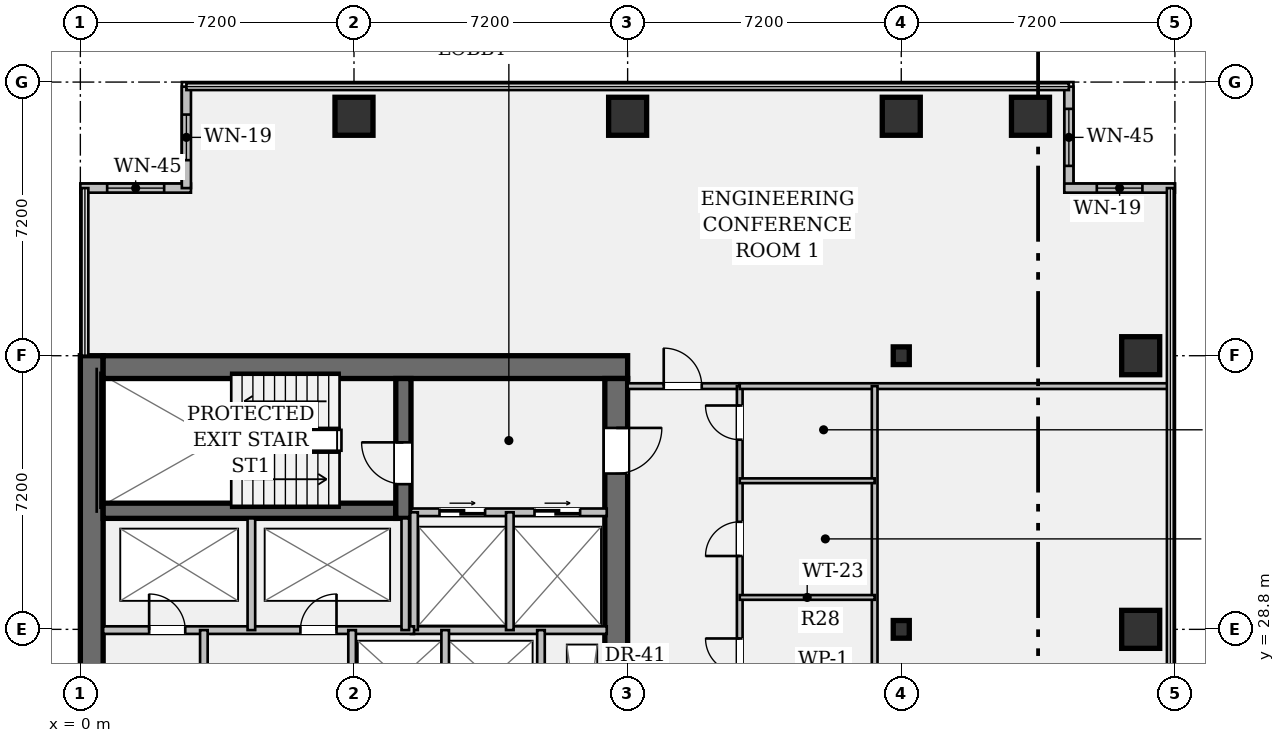
"""IFC4 building model, lengths in metres.
Left out: names, types, materials, properties, quantities, classifications, styles, units other than length and angle.
Written with IfcOpenShell. Run it as: python <this file> out.ifc"""

import sys

from ifc_helpers import new_model, si_unit, direction, frame, frame_2d, origin, origin_2d, place, context, subcontext, project, spatial, rectangle, hollow_rectangle, i_section, extrude, element, fill, save


model = new_model("IFC4")
c1 = context("Model", 3, precision=1e-05, world=origin(), true_north=direction((0.0, 1.0)))
c2 = subcontext(c1, "Body", "Model", "MODEL_VIEW")
j1 = project(units=[si_unit("LENGTHUNIT", "METRE"), si_unit("PLANEANGLEUNIT", "RADIAN")], contexts=[c1])
p1 = place(None, origin())
s1 = spatial("IfcSite", under=j1, at=p1, CompositionType="ELEMENT")
p2 = place(p1, origin())
s2 = spatial("IfcBuilding", under=s1, at=p2, CompositionType="ELEMENT")
p3 = place(p2, frame((0.0, 0.0, 58.1)))
s3 = spatial("IfcBuildingStorey", under=s2, at=p3, CompositionType="ELEMENT", Elevation=58.1)
p4 = place(p3, frame((0.3, 7.2, 0.0), z_axis=(0.0, 0.0, 1.0), x_axis=(0.0, 1.0, 0.0)))
e1 = element("IfcWall", 1, at=p4, inside=s3, PredefinedType="SHEAR", context=c2, shape_type="SweptSolid", body=[
    extrude(rectangle(XDim=28.8, YDim=0.6, at=frame_2d((14.4, 0.0))), origin(), (0.0, 0.0, 1.0), 3.57),
])
p5 = place(p3, frame((0.6, 35.7, 0.0), z_axis=(0.0, 0.0, 1.0), x_axis=(1.0, 0.0, 0.0)))
e2 = element("IfcWall", 2, at=p5, inside=s3, PredefinedType="SHEAR", context=c2, shape_type="SweptSolid", body=[
    extrude(rectangle(XDim=13.8, YDim=0.6, at=frame_2d((6.9, 0.0))), origin(), (0.0, 0.0, 1.0), 3.57),
])
p6 = place(p3, frame((14.1, 35.4, 0.0), z_axis=(0.0, 0.0, 1.0), x_axis=(0.0, -1.0, 0.0)))
e3 = element("IfcWall", 3, at=p6, inside=s3, PredefinedType="SHEAR", context=c2, shape_type="SweptSolid", body=[
    extrude(rectangle(XDim=27.6, YDim=0.6, at=frame_2d((13.8, 0.0))), origin(), (0.0, 0.0, 1.0), 3.57),
])
p7 = place(p6, frame((1.3, 0.0, 0.0)))
e4 = element("IfcOpeningElement", 4, at=p7, cuts=e3, PredefinedType="OPENING", context=c2, shape_type="SweptSolid", body=[
    extrude(rectangle(XDim=1.2, YDim=2.15, at=frame_2d((0.6, 1.075))), frame((0.0, 0.312, 0.0), z_axis=(0.0, -1.0, 0.0), x_axis=(1.0, 0.0, 0.0)), (0.0, 0.0, 1.0), 0.624),
])
p8 = place(p6, frame((25.25, 0.0, 0.0)))
e5 = element("IfcOpeningElement", 5, at=p8, cuts=e3, PredefinedType="OPENING", context=c2, shape_type="SweptSolid", body=[
    extrude(rectangle(XDim=1.2, YDim=2.15, at=frame_2d((0.6, 1.075))), frame((0.0, 0.312, 0.0), z_axis=(0.0, -1.0, 0.0), x_axis=(1.0, 0.0, 0.0)), (0.0, 0.0, 1.0), 0.624),
])
p9 = place(p6, frame((14.6, 0.0, 0.0)))
e6 = element("IfcOpeningElement", 6, at=p9, cuts=e3, PredefinedType="OPENING", context=c2, shape_type="SweptSolid", body=[
    extrude(rectangle(XDim=1.6, YDim=2.2, at=frame_2d((0.8, 1.1))), frame((0.0, 0.312, 0.0), z_axis=(0.0, -1.0, 0.0), x_axis=(1.0, 0.0, 0.0)), (0.0, 0.0, 1.0), 0.624),
])
p10 = place(p3, frame((0.6, 31.92, 0.0), z_axis=(0.0, 0.0, 1.0), x_axis=(1.0, 0.0, 0.0)))
e7 = element("IfcWall", 7, at=p10, inside=s3, PredefinedType="SHEAR", context=c2, shape_type="SweptSolid", body=[
    extrude(rectangle(XDim=7.7, YDim=0.4, at=frame_2d((3.85, 0.0))), origin(), (0.0, 0.0, 1.0), 3.57),
])
p11 = place(p3, frame((8.5, 31.72, 0.0), z_axis=(0.0, 0.0, 1.0), x_axis=(0.0, 1.0, 0.0)))
e8 = element("IfcWall", 8, at=p11, inside=s3, PredefinedType="SHEAR", context=c2, shape_type="SweptSolid", body=[
    extrude(rectangle(XDim=3.68, YDim=0.4, at=frame_2d((1.84, 0.0))), origin(), (0.0, 0.0, 1.0), 3.57),
])
p12 = place(p11, frame((0.9, 0.0, 0.0)))
e9 = element("IfcOpeningElement", 9, at=p12, cuts=e8, PredefinedType="OPENING", context=c2, shape_type="SweptSolid", body=[
    extrude(rectangle(XDim=1.1, YDim=2.15, at=frame_2d((0.55, 1.075))), frame((0.0, 0.212, 0.0), z_axis=(0.0, -1.0, 0.0), x_axis=(1.0, 0.0, 0.0)), (0.0, 0.0, 1.0), 0.424),
])
for number, where, z_axis, x_axis in (
    (10, (7.2, 42.3, 0.0), (0.0, 0.0, 1.0), (1.0, 0.0, 0.0)),
    (11, (14.4, 42.3, 0.0), (0.0, 0.0, 1.0), (1.0, 0.0, 0.0)),
):
    element("IfcColumn", number, at=place(p3, frame(where, z_axis=z_axis, x_axis=x_axis)), inside=s3, PredefinedType="COLUMN", context=c2, shape_type="SweptSolid", body=[
        extrude(hollow_rectangle(XDim=1.0, YDim=1.0, WallThickness=0.065, at=origin_2d()), origin(), (0.0, 0.0, 1.0), 3.57),
    ])
for number, where, z_axis, x_axis in (
    (12, (21.6, 28.8, 0.0), (0.0, 0.0, 1.0), (1.0, 0.0, 0.0)),
    (13, (21.6, 36.0, 0.0), (0.0, 0.0, 1.0), (1.0, 0.0, 0.0)),
):
    element("IfcColumn", number, at=place(p3, frame(where, z_axis=z_axis, x_axis=x_axis)), inside=s3, PredefinedType="COLUMN", context=c2, shape_type="SweptSolid", body=[
        extrude(i_section(OverallWidth=0.422, OverallDepth=0.465, WebThickness=0.045, FlangeThickness=0.073, FilletRadius=0.018, at=origin_2d()), origin(), (0.0, 0.0, 1.0), 3.57),
    ])
for number, where, z_axis, x_axis in (
    (14, (21.6, 42.3, 0.0), (0.0, 0.0, 1.0), (1.0, 0.0, 0.0)),
    (15, (25.0, 42.3, 0.0), (0.0, 0.0, 1.0), (1.0, 0.0, 0.0)),
    (16, (27.9, 28.8, 0.0), (0.0, 0.0, 1.0), (1.0, 0.0, 0.0)),
    (17, (27.9, 36.0, 0.0), (0.0, 0.0, 1.0), (1.0, 0.0, 0.0)),
):
    element("IfcColumn", number, at=place(p3, frame(where, z_axis=z_axis, x_axis=x_axis)), inside=s3, PredefinedType="COLUMN", context=c2, shape_type="SweptSolid", body=[
        extrude(hollow_rectangle(XDim=1.0, YDim=1.0, WallThickness=0.065, at=origin_2d()), origin(), (0.0, 0.0, 1.0), 3.57),
    ])
p13 = place(p3, frame((0.0, 40.41, 0.0), z_axis=(0.0, 0.0, 1.0), x_axis=(1.0, 0.0, 0.0)))
e18 = element("IfcWall", 18, at=p13, inside=s3, PredefinedType="STANDARD", context=c2, shape_type="SweptSolid", body=[
    extrude(rectangle(XDim=2.91, YDim=0.24, at=frame_2d((1.455, 0.0))), origin(), (0.0, 0.0, 1.0), 3.57),
])
p14 = place(p13, frame((0.705, 0.0, 0.95)))
e19 = element("IfcOpeningElement", 19, at=p14, cuts=e18, PredefinedType="OPENING", context=c2, shape_type="SweptSolid", body=[
    extrude(rectangle(XDim=1.5, YDim=1.8, at=frame_2d((0.75, 0.9))), frame((0.0, 0.132, 0.0), z_axis=(0.0, -1.0, 0.0), x_axis=(1.0, 0.0, 0.0)), (0.0, 0.0, 1.0), 0.264),
])
p15 = place(p3, frame((2.79, 40.41, 0.0), z_axis=(0.0, 0.0, 1.0), x_axis=(0.0, 1.0, 0.0)))
e20 = element("IfcWall", 20, at=p15, inside=s3, PredefinedType="STANDARD", context=c2, shape_type="SweptSolid", body=[
    extrude(rectangle(XDim=2.67, YDim=0.24, at=frame_2d((1.335, 0.0))), origin(), (0.0, 0.0, 1.0), 3.57),
])
p16 = place(p15, frame((0.735, 0.0, 0.95)))
e21 = element("IfcOpeningElement", 21, at=p16, cuts=e20, PredefinedType="OPENING", context=c2, shape_type="SweptSolid", body=[
    extrude(rectangle(XDim=1.2, YDim=1.8, at=frame_2d((0.6, 0.9))), frame((0.0, 0.132, 0.0), z_axis=(0.0, -1.0, 0.0), x_axis=(1.0, 0.0, 0.0)), (0.0, 0.0, 1.0), 0.264),
])
p17 = place(p3, frame((26.01, 43.08, 0.0), z_axis=(0.0, 0.0, 1.0), x_axis=(0.0, -1.0, 0.0)))
e22 = element("IfcWall", 22, at=p17, inside=s3, PredefinedType="STANDARD", context=c2, shape_type="SweptSolid", body=[
    extrude(rectangle(XDim=2.67, YDim=0.24, at=frame_2d((1.335, 0.0))), origin(), (0.0, 0.0, 1.0), 3.57),
])
p18 = place(p17, frame((0.585, 0.0, 0.95)))
e23 = element("IfcOpeningElement", 23, at=p18, cuts=e22, PredefinedType="OPENING", context=c2, shape_type="SweptSolid", body=[
    extrude(rectangle(XDim=1.5, YDim=1.8, at=frame_2d((0.75, 0.9))), frame((0.0, 0.132, 0.0), z_axis=(0.0, -1.0, 0.0), x_axis=(1.0, 0.0, 0.0)), (0.0, 0.0, 1.0), 0.264),
])
p19 = place(p3, frame((25.89, 40.41, 0.0), z_axis=(0.0, 0.0, 1.0), x_axis=(1.0, 0.0, 0.0)))
e24 = element("IfcWall", 24, at=p19, inside=s3, PredefinedType="STANDARD", context=c2, shape_type="SweptSolid", body=[
    extrude(rectangle(XDim=2.91, YDim=0.24, at=frame_2d((1.455, 0.0))), origin(), (0.0, 0.0, 1.0), 3.57),
])
p20 = place(p19, frame((0.855, 0.0, 0.95)))
e25 = element("IfcOpeningElement", 25, at=p20, cuts=e24, PredefinedType="OPENING", context=c2, shape_type="SweptSolid", body=[
    extrude(rectangle(XDim=1.2, YDim=1.8, at=frame_2d((0.6, 0.9))), frame((0.0, 0.132, 0.0), z_axis=(0.0, -1.0, 0.0), x_axis=(1.0, 0.0, 0.0)), (0.0, 0.0, 1.0), 0.264),
])
p21 = place(p3, frame((8.7, 31.88, 0.0), z_axis=(0.0, 0.0, 1.0), x_axis=(1.0, 0.0, 0.0)))
e26 = element("IfcWall", 26, at=p21, inside=s3, PredefinedType="PARTITIONING", context=c2, shape_type="SweptSolid", body=[
    extrude(rectangle(XDim=5.15, YDim=0.2, at=frame_2d((2.575, 0.0))), origin(), (0.0, 0.0, 1.0), 3.57),
])
p22 = place(p21, frame((0.75, 0.0, 0.0)))
e27 = element("IfcOpeningElement", 27, at=p22, cuts=e26, PredefinedType="OPENING", context=c2, shape_type="SweptSolid", body=[
    extrude(rectangle(XDim=1.2, YDim=2.2, at=frame_2d((0.6, 1.1))), frame((0.0, 0.112, 0.0), z_axis=(0.0, -1.0, 0.0), x_axis=(1.0, 0.0, 0.0)), (0.0, 0.0, 1.0), 0.224),
])
p23 = place(p21, frame((3.25, 0.0, 0.0)))
e28 = element("IfcOpeningElement", 28, at=p23, cuts=e26, PredefinedType="OPENING", context=c2, shape_type="SweptSolid", body=[
    extrude(rectangle(XDim=1.2, YDim=2.2, at=frame_2d((0.6, 1.1))), frame((0.0, 0.112, 0.0), z_axis=(0.0, -1.0, 0.0), x_axis=(1.0, 0.0, 0.0)), (0.0, 0.0, 1.0), 0.224),
])
p24 = place(p3, frame((8.7, 28.78, 0.0), z_axis=(0.0, 0.0, 1.0), x_axis=(1.0, 0.0, 0.0)))
e29 = element("IfcWall", 29, at=p24, inside=s3, PredefinedType="PARTITIONING", context=c2, shape_type="SweptSolid", body=[
    extrude(rectangle(XDim=5.15, YDim=0.2, at=frame_2d((2.575, 0.0))), origin(), (0.0, 0.0, 1.0), 3.57),
])
for number, where, z_axis, x_axis in (
    (30, (8.78, 28.78, 0.0), (0.0, 0.0, 1.0), (0.0, 1.0, 0.0)),
    (31, (11.3, 28.78, 0.0), (0.0, 0.0, 1.0), (0.0, 1.0, 0.0)),
):
    element("IfcWall", number, at=place(p3, frame(where, z_axis=z_axis, x_axis=x_axis)), inside=s3, PredefinedType="PARTITIONING", context=c2, shape_type="SweptSolid", body=[
        extrude(rectangle(XDim=3.1, YDim=0.2, at=frame_2d((1.55, 0.0))), origin(), (0.0, 0.0, 1.0), 3.57),
    ])
p25 = place(p3, frame((0.6, 28.78, 0.0), z_axis=(0.0, 0.0, 1.0), x_axis=(1.0, 0.0, 0.0)))
e32 = element("IfcWall", 32, at=p25, inside=s3, PredefinedType="PARTITIONING", context=c2, shape_type="SweptSolid", body=[
    extrude(rectangle(XDim=8.18, YDim=0.2, at=frame_2d((4.09, 0.0))), origin(), (0.0, 0.0, 1.0), 3.57),
])
p26 = place(p25, frame((1.21, 0.0, 0.0)))
e33 = element("IfcOpeningElement", 33, at=p26, cuts=e32, PredefinedType="OPENING", context=c2, shape_type="SweptSolid", body=[
    extrude(rectangle(XDim=0.95, YDim=2.15, at=frame_2d((0.475, 1.075))), frame((0.0, 0.112, 0.0), z_axis=(0.0, -1.0, 0.0), x_axis=(1.0, 0.0, 0.0)), (0.0, 0.0, 1.0), 0.224),
])
p27 = place(p25, frame((5.19, 0.0, 0.0)))
e34 = element("IfcOpeningElement", 34, at=p27, cuts=e32, PredefinedType="OPENING", context=c2, shape_type="SweptSolid", body=[
    extrude(rectangle(XDim=0.95, YDim=2.15, at=frame_2d((0.475, 1.075))), frame((0.0, 0.112, 0.0), z_axis=(0.0, -1.0, 0.0), x_axis=(1.0, 0.0, 0.0)), (0.0, 0.0, 1.0), 0.224),
])
for number, where, z_axis, x_axis in (
    (35, (4.5, 28.78, 0.0), (0.0, 0.0, 1.0), (0.0, 1.0, 0.0)),
    (36, (8.55, 28.78, 0.0), (0.0, 0.0, 1.0), (0.0, 1.0, 0.0)),
):
    element("IfcWall", number, at=place(p3, frame(where, z_axis=z_axis, x_axis=x_axis)), inside=s3, PredefinedType="PARTITIONING", context=c2, shape_type="SweptSolid", body=[
        extrude(rectangle(XDim=2.94, YDim=0.2, at=frame_2d((1.47, 0.0))), origin(), (0.0, 0.0, 1.0), 3.57),
    ])
p28 = place(p3, frame((3.25, 15.7, 0.0), z_axis=(0.0, 0.0, 1.0), x_axis=(0.0, 1.0, 0.0)))
e37 = element("IfcWall", 37, at=p28, inside=s3, PredefinedType="PARTITIONING", context=c2, shape_type="SweptSolid", body=[
    extrude(rectangle(XDim=13.08, YDim=0.2, at=frame_2d((6.54, 0.0))), origin(), (0.0, 0.0, 1.0), 3.57),
])
for number, where, z_axis, x_axis in (
    (38, (7.15, 26.4, 0.0), (0.0, 0.0, 1.0), (0.0, 1.0, 0.0)),
    (39, (9.6, 26.4, 0.0), (0.0, 0.0, 1.0), (0.0, 1.0, 0.0)),
):
    element("IfcWall", number, at=place(p3, frame(where, z_axis=z_axis, x_axis=x_axis)), inside=s3, PredefinedType="PARTITIONING", context=c2, shape_type="SweptSolid", body=[
        extrude(rectangle(XDim=2.38, YDim=0.2, at=frame_2d((1.19, 0.0))), origin(), (0.0, 0.0, 1.0), 3.57),
    ])
p29 = place(p3, frame((12.12, 22.2, 0.0), z_axis=(0.0, 0.0, 1.0), x_axis=(0.0, 1.0, 0.0)))
e40 = element("IfcWall", 40, at=p29, inside=s3, PredefinedType="PARTITIONING", context=c2, shape_type="SweptSolid", body=[
    extrude(rectangle(XDim=6.58, YDim=0.2, at=frame_2d((3.29, 0.0))), origin(), (0.0, 0.0, 1.0), 3.57),
])
p30 = place(p29, frame((2.75, 0.0, 0.0)))
e41 = element("IfcOpeningElement", 41, at=p30, cuts=e40, PredefinedType="OPENING", context=c2, shape_type="SweptSolid", body=[
    extrude(rectangle(XDim=0.85, YDim=2.15, at=frame_2d((0.425, 1.075))), frame((0.0, 0.112, 0.0), z_axis=(0.0, -1.0, 0.0), x_axis=(1.0, 0.0, 0.0)), (0.0, 0.0, 1.0), 0.224),
])
p31 = place(p3, frame((14.4, 35.2, 0.0), z_axis=(0.0, 0.0, 1.0), x_axis=(1.0, 0.0, 0.0)))
e42 = element("IfcWall", 42, at=p31, inside=s3, PredefinedType="PARTITIONING", context=c2, shape_type="SweptSolid", body=[
    extrude(rectangle(XDim=2.95, YDim=0.15, at=frame_2d((1.475, 0.0))), origin(), (0.0, 0.0, 1.0), 3.088),
])
p32 = place(p31, frame((0.95, 0.0, 0.0)))
e43 = element("IfcOpeningElement", 43, at=p32, cuts=e42, PredefinedType="OPENING", context=c2, shape_type="SweptSolid", body=[
    extrude(rectangle(XDim=1.0, YDim=2.15, at=frame_2d((0.5, 1.075))), frame((0.0, 0.087, 0.0), z_axis=(0.0, -1.0, 0.0), x_axis=(1.0, 0.0, 0.0)), (0.0, 0.0, 1.0), 0.174),
])
p33 = place(p3, frame((17.35, 20.8, 0.0), z_axis=(0.0, 0.0, 1.0), x_axis=(0.0, 1.0, 0.0)))
e44 = element("IfcWall", 44, at=p33, inside=s3, PredefinedType="PARTITIONING", context=c2, shape_type="SweptSolid", body=[
    extrude(rectangle(XDim=14.4, YDim=0.15, at=frame_2d((7.2, 0.0))), origin(), (0.0, 0.0, 1.0), 2.699),
])
p34 = place(p33, frame((3.79, 0.0, 0.0)))
e45 = element("IfcOpeningElement", 45, at=p34, cuts=e44, PredefinedType="OPENING", context=c2, shape_type="SweptSolid", body=[
    extrude(rectangle(XDim=0.9, YDim=2.15, at=frame_2d((0.45, 1.075))), frame((0.0, 0.087, 0.0), z_axis=(0.0, -1.0, 0.0), x_axis=(1.0, 0.0, 0.0)), (0.0, 0.0, 1.0), 0.174),
])
p35 = place(p33, frame((6.86, 0.0, 0.0)))
e46 = element("IfcOpeningElement", 46, at=p35, cuts=e44, PredefinedType="OPENING", context=c2, shape_type="SweptSolid", body=[
    extrude(rectangle(XDim=0.9, YDim=2.15, at=frame_2d((0.45, 1.075))), frame((0.0, 0.087, 0.0), z_axis=(0.0, -1.0, 0.0), x_axis=(1.0, 0.0, 0.0)), (0.0, 0.0, 1.0), 0.174),
])
p36 = place(p33, frame((9.93, 0.0, 0.0)))
e47 = element("IfcOpeningElement", 47, at=p36, cuts=e44, PredefinedType="OPENING", context=c2, shape_type="SweptSolid", body=[
    extrude(rectangle(XDim=0.9, YDim=2.15, at=frame_2d((0.45, 1.075))), frame((0.0, 0.087, 0.0), z_axis=(0.0, -1.0, 0.0), x_axis=(1.0, 0.0, 0.0)), (0.0, 0.0, 1.0), 0.174),
])
p37 = place(p33, frame((12.99, 0.0, 0.0)))
e48 = element("IfcOpeningElement", 48, at=p37, cuts=e44, PredefinedType="OPENING", context=c2, shape_type="SweptSolid", body=[
    extrude(rectangle(XDim=0.9, YDim=2.15, at=frame_2d((0.45, 1.075))), frame((0.0, 0.087, 0.0), z_axis=(0.0, -1.0, 0.0), x_axis=(1.0, 0.0, 0.0)), (0.0, 0.0, 1.0), 0.174),
])
p38 = place(p3, frame((17.35, 35.2, 0.0), z_axis=(0.0, 0.0, 1.0), x_axis=(1.0, 0.0, 0.0)))
e49 = element("IfcWall", 49, at=p38, inside=s3, PredefinedType="PARTITIONING", context=c2, shape_type="SweptSolid", body=[
    extrude(rectangle(XDim=11.33, YDim=0.15, at=frame_2d((5.665, 0.0))), origin(), (0.0, 0.0, 1.0), 2.699),
])
p39 = place(p3, frame((20.9, 23.4, 0.0), z_axis=(0.0, 0.0, 1.0), x_axis=(0.0, 1.0, 0.0)))
e50 = element("IfcWall", 50, at=p39, inside=s3, PredefinedType="PARTITIONING", context=c2, shape_type="SweptSolid", body=[
    extrude(rectangle(XDim=11.8, YDim=0.15, at=frame_2d((5.9, 0.0))), origin(), (0.0, 0.0, 1.0), 2.699),
])
for number, where, z_axis, x_axis in (
    (51, (17.35, 29.64, 0.0), (0.0, 0.0, 1.0), (1.0, 0.0, 0.0)),
    (52, (17.35, 32.71, 0.0), (0.0, 0.0, 1.0), (1.0, 0.0, 0.0)),
):
    element("IfcWall", number, at=place(p3, frame(where, z_axis=z_axis, x_axis=x_axis)), inside=s3, PredefinedType="PARTITIONING", context=c2, shape_type="SweptSolid", body=[
        extrude(rectangle(XDim=3.55, YDim=0.125, at=frame_2d((1.775, 0.0))), origin(), (0.0, 0.0, 1.0), 3.088),
    ])
p40 = place(p14, origin())
e53 = element("IfcWindow", 53, at=p40, inside=s3, PartitioningType="SINGLE_PANEL", PredefinedType="WINDOW", context=c2, shape_type="SweptSolid", body=[
    extrude(rectangle(XDim=1.5, YDim=1.8, at=frame_2d((0.75, 0.9))), frame((0.0, 0.03, 0.0), z_axis=(0.0, -1.0, 0.0), x_axis=(1.0, 0.0, 0.0)), (0.0, 0.0, 1.0), 0.06),
])
fill(e19, e53)
p41 = place(p16, origin())
e54 = element("IfcWindow", 54, at=p41, inside=s3, PartitioningType="SINGLE_PANEL", PredefinedType="WINDOW", context=c2, shape_type="SweptSolid", body=[
    extrude(rectangle(XDim=1.2, YDim=1.8, at=frame_2d((0.6, 0.9))), frame((0.0, 0.03, 0.0), z_axis=(0.0, -1.0, 0.0), x_axis=(1.0, 0.0, 0.0)), (0.0, 0.0, 1.0), 0.06),
])
fill(e21, e54)
p42 = place(p18, origin())
e55 = element("IfcWindow", 55, at=p42, inside=s3, PartitioningType="SINGLE_PANEL", PredefinedType="WINDOW", context=c2, shape_type="SweptSolid", body=[
    extrude(rectangle(XDim=1.5, YDim=1.8, at=frame_2d((0.75, 0.9))), frame((0.0, 0.03, 0.0), z_axis=(0.0, -1.0, 0.0), x_axis=(1.0, 0.0, 0.0)), (0.0, 0.0, 1.0), 0.06),
])
fill(e23, e55)
p43 = place(p20, origin())
e56 = element("IfcWindow", 56, at=p43, inside=s3, PartitioningType="SINGLE_PANEL", PredefinedType="WINDOW", context=c2, shape_type="SweptSolid", body=[
    extrude(rectangle(XDim=1.2, YDim=1.8, at=frame_2d((0.6, 0.9))), frame((0.0, 0.03, 0.0), z_axis=(0.0, -1.0, 0.0), x_axis=(1.0, 0.0, 0.0)), (0.0, 0.0, 1.0), 0.06),
])
fill(e25, e56)
p44 = place(p12, origin())
e57 = element("IfcDoor", 57, at=p44, inside=s3, OperationType="SINGLE_SWING_RIGHT", PredefinedType="DOOR", context=c2, shape_type="SweptSolid", body=[
    extrude(rectangle(XDim=1.1, YDim=2.15, at=frame_2d((0.55, 1.075))), frame((0.0, 0.025, 0.0), z_axis=(0.0, -1.0, 0.0), x_axis=(1.0, 0.0, 0.0)), (0.0, 0.0, 1.0), 0.05),
])
fill(e9, e57)
p45 = place(p7, origin())
e58 = element("IfcDoor", 58, at=p45, inside=s3, OperationType="SINGLE_SWING_LEFT", PredefinedType="DOOR", context=c2, shape_type="SweptSolid", body=[
    extrude(rectangle(XDim=1.2, YDim=2.15, at=frame_2d((0.6, 1.075))), frame((0.0, 0.025, 0.0), z_axis=(0.0, -1.0, 0.0), x_axis=(1.0, 0.0, 0.0)), (0.0, 0.0, 1.0), 0.05),
])
fill(e4, e58)
p46 = place(p22, origin())
e59 = element("IfcDoor", 59, at=p46, inside=s3, OperationType="DOUBLE_DOOR_SLIDING", PredefinedType="DOOR", context=c2, shape_type="SweptSolid", body=[
    extrude(rectangle(XDim=1.2, YDim=2.2, at=frame_2d((0.6, 1.1))), frame((0.0, 0.025, 0.0), z_axis=(0.0, -1.0, 0.0), x_axis=(1.0, 0.0, 0.0)), (0.0, 0.0, 1.0), 0.05),
])
fill(e27, e59)
p47 = place(p23, origin())
e60 = element("IfcDoor", 60, at=p47, inside=s3, OperationType="DOUBLE_DOOR_SLIDING", PredefinedType="DOOR", context=c2, shape_type="SweptSolid", body=[
    extrude(rectangle(XDim=1.2, YDim=2.2, at=frame_2d((0.6, 1.1))), frame((0.0, 0.025, 0.0), z_axis=(0.0, -1.0, 0.0), x_axis=(1.0, 0.0, 0.0)), (0.0, 0.0, 1.0), 0.05),
])
fill(e28, e60)
p48 = place(p26, origin())
e61 = element("IfcDoor", 61, at=p48, inside=s3, OperationType="SINGLE_SWING_LEFT", PredefinedType="DOOR", context=c2, shape_type="SweptSolid", body=[
    extrude(rectangle(XDim=0.95, YDim=2.15, at=frame_2d((0.475, 1.075))), frame((0.0, 0.025, 0.0), z_axis=(0.0, -1.0, 0.0), x_axis=(1.0, 0.0, 0.0)), (0.0, 0.0, 1.0), 0.05),
])
fill(e33, e61)
p49 = place(p27, origin())
e62 = element("IfcDoor", 62, at=p49, inside=s3, OperationType="SINGLE_SWING_RIGHT", PredefinedType="DOOR", context=c2, shape_type="SweptSolid", body=[
    extrude(rectangle(XDim=0.95, YDim=2.15, at=frame_2d((0.475, 1.075))), frame((0.0, 0.025, 0.0), z_axis=(0.0, -1.0, 0.0), x_axis=(1.0, 0.0, 0.0)), (0.0, 0.0, 1.0), 0.05),
])
fill(e34, e62)
p50 = place(p32, origin())
e63 = element("IfcDoor", 63, at=p50, inside=s3, OperationType="SINGLE_SWING_LEFT", PredefinedType="DOOR", context=c2, shape_type="SweptSolid", body=[
    extrude(rectangle(XDim=1.0, YDim=2.15, at=frame_2d((0.5, 1.075))), frame((0.0, 0.025, 0.0), z_axis=(0.0, -1.0, 0.0), x_axis=(1.0, 0.0, 0.0)), (0.0, 0.0, 1.0), 0.05),
])
fill(e43, e63)
p51 = place(p35, origin())
e64 = element("IfcDoor", 64, at=p51, inside=s3, OperationType="SINGLE_SWING_RIGHT", PredefinedType="DOOR", context=c2, shape_type="SweptSolid", body=[
    extrude(rectangle(XDim=0.9, YDim=2.15, at=frame_2d((0.45, 1.075))), frame((0.0, 0.025, 0.0), z_axis=(0.0, -1.0, 0.0), x_axis=(1.0, 0.0, 0.0)), (0.0, 0.0, 1.0), 0.05),
])
fill(e46, e64)
p52 = place(p36, origin())
e65 = element("IfcDoor", 65, at=p52, inside=s3, OperationType="SINGLE_SWING_LEFT", PredefinedType="DOOR", context=c2, shape_type="SweptSolid", body=[
    extrude(rectangle(XDim=0.9, YDim=2.15, at=frame_2d((0.45, 1.075))), frame((0.0, 0.025, 0.0), z_axis=(0.0, -1.0, 0.0), x_axis=(1.0, 0.0, 0.0)), (0.0, 0.0, 1.0), 0.05),
])
fill(e47, e65)
p53 = place(p37, origin())
e66 = element("IfcDoor", 66, at=p53, inside=s3, OperationType="SINGLE_SWING_RIGHT", PredefinedType="DOOR", context=c2, shape_type="SweptSolid", body=[
    extrude(rectangle(XDim=0.9, YDim=2.15, at=frame_2d((0.45, 1.075))), frame((0.0, 0.025, 0.0), z_axis=(0.0, -1.0, 0.0), x_axis=(1.0, 0.0, 0.0)), (0.0, 0.0, 1.0), 0.05),
])
fill(e48, e66)
save(model, sys.argv[1])
